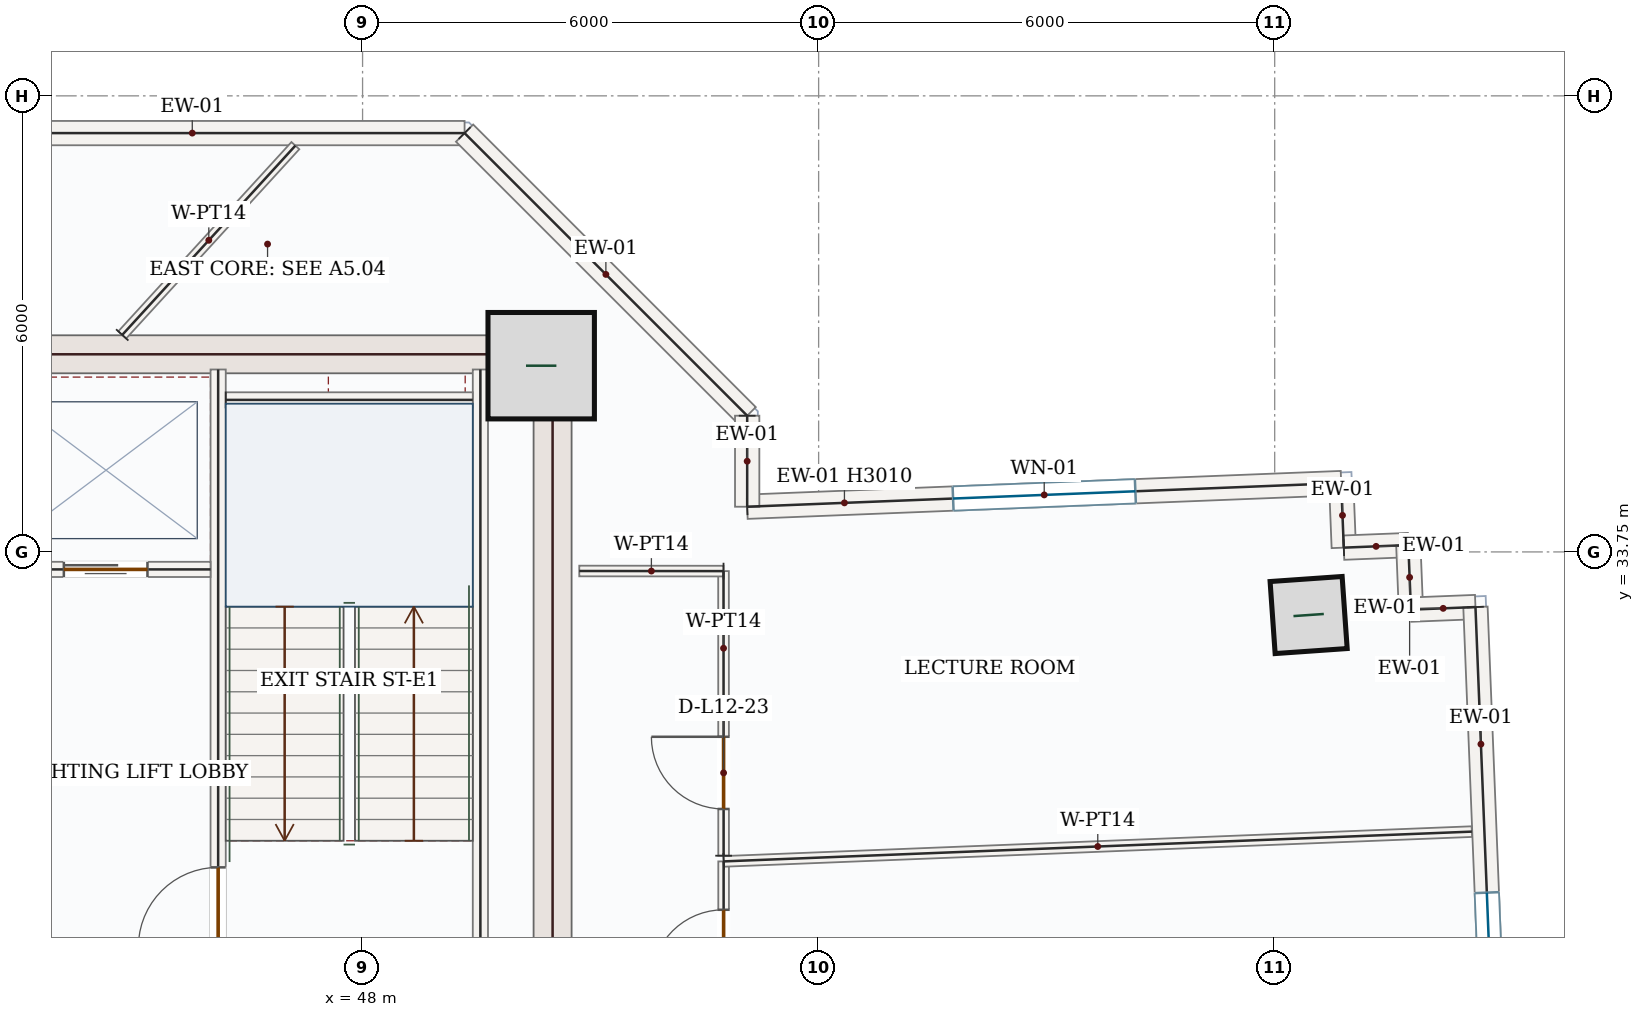
"""IFC4 building model, lengths in metres.
Left out: names, types, materials, properties, quantities, classifications, styles, units other than length and angle.
Written with IfcOpenShell. Run it as: python <this file> out.ifc"""

import sys

from ifc_helpers import new_model, si_unit, direction, frame, frame_2d, origin, origin_2d, place, context, subcontext, project, spatial, rectangle, hollow_rectangle, extrude, source, transform, mapped, element, fill, save


model = new_model("IFC4")
c1 = context("Model", 3, precision=1e-05, world=origin(), true_north=direction((0.0, 1.0)))
c2 = subcontext(c1, "Body", "Model", "MODEL_VIEW")
j1 = project(units=[si_unit("LENGTHUNIT", "METRE"), si_unit("PLANEANGLEUNIT", "RADIAN")], contexts=[c1])
p1 = place(None, origin())
s1 = spatial("IfcSite", under=j1, at=p1, CompositionType="ELEMENT")
p2 = place(p1, origin())
s2 = spatial("IfcBuilding", under=s1, at=p2, CompositionType="ELEMENT")
p3 = place(p2, frame((0.0, 0.0, 58.5)))
s3 = spatial("IfcBuildingStorey", under=s2, at=p3, CompositionType="ELEMENT", Elevation=58.5)
m1 = source(origin(), c2, "Body", "SweptSolid", [
    extrude(rectangle(XDim=8.55, YDim=0.5, at=frame_2d((4.275, 0.0))), origin(), (0.0, 0.0, 1.0), 3.95),
])
p4 = place(p3, frame((50.5, 28.05, 0.0), z_axis=(0.0, 0.0, 1.0), x_axis=(0.0, 1.0, 0.0)))
e1 = element("IfcWall", 1, at=p4, inside=s3, PredefinedType="SHEAR", context=c2, shape_type="MappedRepresentation", body=[
    mapped(m1, transform((0.0, 0.0, 0.0), x_axis=(1.0, 0.0, 0.0), y_axis=(0.0, 1.0, 0.0), z_axis=(0.0, 0.0, 1.0), scale=1.0)),
])
m2 = source(origin(), c2, "Body", "SweptSolid", [
    extrude(rectangle(XDim=7.0, YDim=0.5, at=frame_2d((3.5, 0.0))), origin(), (0.0, 0.0, 1.0), 3.95),
])
p5 = place(p3, frame((43.25, 36.35, 0.0), z_axis=(0.0, 0.0, 1.0), x_axis=(1.0, 0.0, 0.0)))
e2 = element("IfcWall", 2, at=p5, inside=s3, PredefinedType="SHEAR", context=c2, shape_type="MappedRepresentation", body=[
    mapped(m2, transform((0.0, 0.0, 0.0), x_axis=(1.0, 0.0, 0.0), y_axis=(0.0, 1.0, 0.0), z_axis=(0.0, 0.0, 1.0), scale=1.0)),
])
m3 = source(origin(), c2, "Body", "SweptSolid", [
    extrude(rectangle(XDim=1.4, YDim=1.4, at=origin_2d()), origin(), (0.0, 0.0, 1.0), 4.2),
])
p6 = place(p3, frame((50.35, 36.2, 0.0), z_axis=(0.0, 0.0, 1.0), x_axis=(1.0, 0.0, 0.0)))
e3 = element("IfcColumn", 3, at=p6, inside=s3, PredefinedType="COLUMN", context=c2, shape_type="MappedRepresentation", body=[
    mapped(m3, transform((0.0, 0.0, 0.0), x_axis=(1.0, 0.0, 0.0), y_axis=(0.0, 1.0, 0.0), z_axis=(0.0, 0.0, 1.0), scale=1.0)),
])
m4 = source(origin(), c2, "Body", "SweptSolid", [
    extrude(hollow_rectangle(XDim=0.95, YDim=0.95, WallThickness=0.05, at=origin_2d()), origin(), (0.0, 0.0, 1.0), 4.2),
])
p7 = place(p3, frame((60.447, 32.92, 0.0), z_axis=(0.0, 0.0, 1.0), x_axis=(0.99756405026, 0.069756473744, 0.0)))
e4 = element("IfcColumn", 4, at=p7, inside=s3, PredefinedType="COLUMN", context=c2, shape_type="MappedRepresentation", body=[
    mapped(m4, transform((0.0, 0.0, 0.0), x_axis=(1.0, 0.0, 0.0), y_axis=(0.0, 1.0, 0.0), z_axis=(0.0, 0.0, 1.0), scale=1.0)),
])
p8 = place(p3, frame((53.06, 34.344, 0.0), z_axis=(0.0, 0.0, 1.0), x_axis=(0.999208917222, 0.039768577336, 0.0)))
e5 = element("IfcWall", 5, at=p8, inside=s3, PredefinedType="SOLIDWALL", context=c2, shape_type="SweptSolid", body=[
    extrude(rectangle(XDim=7.821, YDim=0.32, at=frame_2d((3.911, 0.0))), origin(), (0.0, 0.0, 1.0), 3.01),
])
p9 = place(p8, frame((2.711, 0.0, 0.85)))
e6 = element("IfcOpeningElement", 6, at=p9, cuts=e5, PredefinedType="OPENING", context=c2, shape_type="SweptSolid", body=[
    extrude(rectangle(XDim=2.4, YDim=1.8, at=frame_2d((1.2, 0.9))), frame((0.0, 0.17, 0.0), z_axis=(0.0, -1.0, 0.0), x_axis=(1.0, 0.0, 0.0)), (0.0, 0.0, 1.0), 0.34),
])
m5 = source(origin(), c2, "Body", "SweptSolid", [
    extrude(rectangle(XDim=0.85, YDim=0.32, at=frame_2d((0.425, 0.0))), origin(), (0.0, 0.0, 1.0), 3.95),
])
p10 = place(p3, frame((60.875, 34.656, 0.0), z_axis=(0.0, 0.0, 1.0), x_axis=(0.039933618331, -0.999202334929, 0.0)))
e7 = element("IfcWall", 7, at=p10, inside=s3, PredefinedType="SOLIDWALL", context=c2, shape_type="MappedRepresentation", body=[
    mapped(m5, transform((0.0, 0.0, 0.0), x_axis=(1.0, 0.0, 0.0), y_axis=(0.0, 1.0, 0.0), z_axis=(0.0, 0.0, 1.0), scale=1.0)),
])
m6 = source(origin(), c2, "Body", "SweptSolid", [
    extrude(rectangle(XDim=0.85, YDim=0.32, at=frame_2d((0.425, 0.0))), origin(), (0.0, 0.0, 1.0), 3.95),
])
for number, where, z_axis, x_axis in (
    (8, (60.909, 33.806, 0.0), (0.0, 0.0, 1.0), (0.999, 0.04, 0.0)),
    (9, (61.758, 33.84, 0.0), (0.0, 0.0, 1.0), (0.04, -0.999, 0.0)),
    (10, (61.792, 32.991, 0.0), (0.0, 0.0, 1.0), (0.999, 0.04, 0.0)),
):
    element("IfcWall", number, at=place(p3, frame(where, z_axis=z_axis, x_axis=x_axis)), inside=s3, PredefinedType="SOLIDWALL", context=c2, shape_type="MappedRepresentation", body=[
        mapped(m6, transform((0.0, 0.0, 0.0), x_axis=(1.0, 0.0, 0.0), y_axis=(0.0, 1.0, 0.0), z_axis=(0.0, 0.0, 1.0), scale=1.0)),
    ])
p11 = place(p3, frame((62.641, 33.025, 0.0), z_axis=(0.0, 0.0, 1.0), x_axis=(0.03977146366, -0.999208802342, 0.0)))
e11 = element("IfcWall", 11, at=p11, inside=s3, PredefinedType="SOLIDWALL", context=c2, shape_type="SweptSolid", body=[
    extrude(rectangle(XDim=9.92, YDim=0.32, at=frame_2d((4.96, 0.0))), origin(), (0.0, 0.0, 1.0), 3.95),
])
p12 = place(p11, frame((3.76, 0.0, 0.85)))
e12 = element("IfcOpeningElement", 12, at=p12, cuts=e11, PredefinedType="OPENING", context=c2, shape_type="SweptSolid", body=[
    extrude(rectangle(XDim=2.4, YDim=1.8, at=frame_2d((1.2, 0.9))), frame((0.0, 0.17, 0.0), z_axis=(0.0, -1.0, 0.0), x_axis=(1.0, 0.0, 0.0)), (0.0, 0.0, 1.0), 0.34),
])
m7 = source(origin(), c2, "Body", "SweptSolid", [
    extrude(rectangle(XDim=7.165, YDim=0.32, at=frame_2d((3.583, 0.0))), origin(), (0.0, 0.0, 1.0), 3.95),
])
p13 = place(p3, frame((42.177, 39.26, 0.0), z_axis=(0.0, 0.0, 1.0), x_axis=(1.0, 0.0, 0.0)))
e13 = element("IfcWall", 13, at=p13, inside=s3, PredefinedType="SOLIDWALL", context=c2, shape_type="MappedRepresentation", body=[
    mapped(m7, transform((0.0, 0.0, 0.0), x_axis=(1.0, 0.0, 0.0), y_axis=(0.0, 1.0, 0.0), z_axis=(0.0, 0.0, 1.0), scale=1.0)),
])
m8 = source(origin(), c2, "Body", "SweptSolid", [
    extrude(rectangle(XDim=5.258, YDim=0.32, at=frame_2d((2.629, 0.0))), origin(), (0.0, 0.0, 1.0), 3.95),
])
p14 = place(p3, frame((49.342, 39.26, 0.0), z_axis=(0.0, 0.0, 1.0), x_axis=(0.707106781187, -0.707106781187, 0.0)))
e14 = element("IfcWall", 14, at=p14, inside=s3, PredefinedType="SOLIDWALL", context=c2, shape_type="MappedRepresentation", body=[
    mapped(m8, transform((0.0, 0.0, 0.0), x_axis=(1.0, 0.0, 0.0), y_axis=(0.0, 1.0, 0.0), z_axis=(0.0, 0.0, 1.0), scale=1.0)),
])
m9 = source(origin(), c2, "Body", "SweptSolid", [
    extrude(rectangle(XDim=1.198, YDim=0.32, at=frame_2d((0.599, 0.0))), origin(), (0.0, 0.0, 1.0), 3.95),
])
p15 = place(p3, frame((53.06, 35.542, 0.0), z_axis=(0.0, 0.0, 1.0), x_axis=(0.0, -1.0, 0.0)))
e15 = element("IfcWall", 15, at=p15, inside=s3, PredefinedType="SOLIDWALL", context=c2, shape_type="MappedRepresentation", body=[
    mapped(m9, transform((0.0, 0.0, 0.0), x_axis=(1.0, 0.0, 0.0), y_axis=(0.0, 1.0, 0.0), z_axis=(0.0, 0.0, 1.0), scale=1.0)),
])
m10 = source(origin(), c2, "Body", "SweptSolid", [
    extrude(rectangle(XDim=7.87, YDim=0.2, at=frame_2d((3.935, 0.0))), origin(), (0.0, 0.0, 1.0), 3.95),
])
p16 = place(p3, frame((49.55, 28.28, 0.0), z_axis=(0.0, 0.0, 1.0), x_axis=(0.0, 1.0, 0.0)))
e16 = element("IfcWall", 16, at=p16, inside=s3, PredefinedType="SOLIDWALL", context=c2, shape_type="MappedRepresentation", body=[
    mapped(m10, transform((0.0, 0.0, 0.0), x_axis=(1.0, 0.0, 0.0), y_axis=(0.0, 1.0, 0.0), z_axis=(0.0, 0.0, 1.0), scale=1.0)),
])
p17 = place(p3, frame((46.1, 28.15, 0.0), z_axis=(0.0, 0.0, 1.0), x_axis=(0.0, 1.0, 0.0)))
e17 = element("IfcWall", 17, at=p17, inside=s3, PredefinedType="SOLIDWALL", context=c2, shape_type="SweptSolid", body=[
    extrude(rectangle(XDim=8.0, YDim=0.2, at=frame_2d((4.0, 0.0))), origin(), (0.0, 0.0, 1.0), 3.95),
])
p18 = place(p17, frame((0.4, 0.0, 0.0)))
e18 = element("IfcOpeningElement", 18, at=p18, cuts=e17, PredefinedType="OPENING", context=c2, shape_type="SweptSolid", body=[
    extrude(rectangle(XDim=1.05, YDim=2.15, at=frame_2d((0.525, 1.075))), frame((0.0, 0.11, 0.0), z_axis=(0.0, -1.0, 0.0), x_axis=(1.0, 0.0, 0.0)), (0.0, 0.0, 1.0), 0.22),
])
m11 = source(origin(), c2, "Body", "SweptSolid", [
    extrude(rectangle(XDim=3.25, YDim=0.2, at=frame_2d((1.625, 0.0))), origin(), (0.0, 0.0, 1.0), 3.95),
])
p19 = place(p3, frame((46.2, 35.75, 0.0), z_axis=(0.0, 0.0, 1.0), x_axis=(1.0, 0.0, 0.0)))
e19 = element("IfcWall", 19, at=p19, inside=s3, PredefinedType="SOLIDWALL", context=c2, shape_type="MappedRepresentation", body=[
    mapped(m11, transform((0.0, 0.0, 0.0), x_axis=(1.0, 0.0, 0.0), y_axis=(0.0, 1.0, 0.0), z_axis=(0.0, 0.0, 1.0), scale=1.0)),
])
p20 = place(p3, frame((43.25, 33.52, 0.0), z_axis=(0.0, 0.0, 1.0), x_axis=(1.0, 0.0, 0.0)))
e20 = element("IfcWall", 20, at=p20, inside=s3, PredefinedType="SOLIDWALL", context=c2, shape_type="SweptSolid", body=[
    extrude(rectangle(XDim=2.75, YDim=0.2, at=frame_2d((1.375, 0.0))), origin(), (0.0, 0.0, 1.0), 3.95),
])
p21 = place(p20, frame((0.82, 0.0, 0.0)))
e21 = element("IfcOpeningElement", 21, at=p21, cuts=e20, PredefinedType="OPENING", context=c2, shape_type="SweptSolid", body=[
    extrude(rectangle(XDim=1.1, YDim=2.15, at=frame_2d((0.55, 1.075))), frame((0.0, 0.11, 0.0), z_axis=(0.0, -1.0, 0.0), x_axis=(1.0, 0.0, 0.0)), (0.0, 0.0, 1.0), 0.22),
])
p22 = place(p3, frame((52.75, 25.835, 0.0), z_axis=(0.0, 0.0, 1.0), x_axis=(0.0, 1.0, 0.0)))
e22 = element("IfcWall", 22, at=p22, inside=s3, PredefinedType="PARTITIONING", context=c2, shape_type="SweptSolid", body=[
    extrude(rectangle(XDim=3.843, YDim=0.14, at=frame_2d((1.921, 0.0))), origin(), (0.0, 0.0, 1.0), 3.95),
])
p23 = place(p22, frame((2.257, 0.0, 0.0)))
e23 = element("IfcOpeningElement", 23, at=p23, cuts=e22, PredefinedType="OPENING", context=c2, shape_type="SweptSolid", body=[
    extrude(rectangle(XDim=0.95, YDim=2.15, at=frame_2d((0.475, 1.075))), frame((0.0, 0.08, 0.0), z_axis=(0.0, -1.0, 0.0), x_axis=(1.0, 0.0, 0.0)), (0.0, 0.0, 1.0), 0.16),
])
m12 = source(origin(), c2, "Body", "SweptSolid", [
    extrude(rectangle(XDim=9.851, YDim=0.14, at=frame_2d((4.925, 0.0))), origin(), (0.0, 0.0, 1.0), 3.95),
])
p24 = place(p3, frame((52.751, 29.678, 0.0), z_axis=(0.0, 0.0, 1.0), x_axis=(0.999208542072, 0.039778002084, 0.0)))
e24 = element("IfcWall", 24, at=p24, inside=s3, PredefinedType="PARTITIONING", context=c2, shape_type="MappedRepresentation", body=[
    mapped(m12, transform((0.0, 0.0, 0.0), x_axis=(1.0, 0.0, 0.0), y_axis=(0.0, 1.0, 0.0), z_axis=(0.0, 0.0, 1.0), scale=1.0)),
])
m13 = source(origin(), c2, "Body", "SweptSolid", [
    extrude(rectangle(XDim=3.375, YDim=0.14, at=frame_2d((1.688, 0.0))), origin(), (0.0, 0.0, 1.0), 3.95),
])
p25 = place(p3, frame((44.838, 36.605, 0.0), z_axis=(0.0, 0.0, 1.0), x_axis=(0.674974079893, 0.737841440604, 0.0)))
e25 = element("IfcWall", 25, at=p25, inside=s3, PredefinedType="PARTITIONING", context=c2, shape_type="MappedRepresentation", body=[
    mapped(m13, transform((0.0, 0.0, 0.0), x_axis=(1.0, 0.0, 0.0), y_axis=(0.0, 1.0, 0.0), z_axis=(0.0, 0.0, 1.0), scale=1.0)),
])
p26 = place(p3, frame((52.75, 29.753, 0.0), z_axis=(0.0, 0.0, 1.0), x_axis=(-0.000326030238, 0.999999946852, 0.0)))
e26 = element("IfcWall", 26, at=p26, inside=s3, PredefinedType="PARTITIONING", context=c2, shape_type="SweptSolid", body=[
    extrude(rectangle(XDim=3.744, YDim=0.14, at=frame_2d((1.872, 0.0))), origin(), (0.0, 0.0, 1.0), 3.95),
])
p27 = place(p26, frame((0.615, 0.0, 0.0)))
e27 = element("IfcOpeningElement", 27, at=p27, cuts=e26, PredefinedType="OPENING", context=c2, shape_type="SweptSolid", body=[
    extrude(rectangle(XDim=0.95, YDim=2.15, at=frame_2d((0.475, 1.075))), frame((0.0, 0.08, 0.0), z_axis=(0.0, -1.0, 0.0), x_axis=(1.0, 0.0, 0.0)), (0.0, 0.0, 1.0), 0.16),
])
m14 = source(origin(), c2, "Body", "SweptSolid", [
    extrude(rectangle(XDim=1.898, YDim=0.14, at=frame_2d((0.949, 0.0))), origin(), (0.0, 0.0, 1.0), 3.95),
])
p28 = place(p3, frame((52.749, 33.498, 0.0), z_axis=(0.0, 0.0, 1.0), x_axis=(-0.999999702083, 0.00077190251, 0.0)))
e28 = element("IfcWall", 28, at=p28, inside=s3, PredefinedType="PARTITIONING", context=c2, shape_type="MappedRepresentation", body=[
    mapped(m14, transform((0.0, 0.0, 0.0), x_axis=(1.0, 0.0, 0.0), y_axis=(0.0, 1.0, 0.0), z_axis=(0.0, 0.0, 1.0), scale=1.0)),
])
m15 = source(origin(), c2, "Body", "SweptSolid", [
    extrude(rectangle(XDim=2.4, YDim=1.8, at=frame_2d((1.2, 0.9))), frame((0.0, 0.03, 0.0), z_axis=(0.0, -1.0, 0.0), x_axis=(1.0, 0.0, 0.0)), (0.0, 0.0, 1.0), 0.06),
])
p29 = place(p9, origin())
e29 = element("IfcWindow", 29, at=p29, inside=s3, PartitioningType="DOUBLE_PANEL_VERTICAL", PredefinedType="WINDOW", context=c2, shape_type="MappedRepresentation", body=[
    mapped(m15, transform((0.0, 0.0, 0.0), x_axis=(1.0, 0.0, 0.0), y_axis=(0.0, 1.0, 0.0), z_axis=(0.0, 0.0, 1.0), scale=1.0)),
])
fill(e6, e29)
p30 = place(p12, origin())
e30 = element("IfcWindow", 30, at=p30, inside=s3, PartitioningType="DOUBLE_PANEL_VERTICAL", PredefinedType="WINDOW", context=c2, shape_type="MappedRepresentation", body=[
    mapped(m15, transform((0.0, 0.0, 0.0), x_axis=(1.0, 0.0, 0.0), y_axis=(0.0, 1.0, 0.0), z_axis=(0.0, 0.0, 1.0), scale=1.0)),
])
fill(e12, e30)
m16 = source(origin(), c2, "Body", "SweptSolid", [
    extrude(rectangle(XDim=1.05, YDim=2.15, at=frame_2d((0.525, 1.075))), frame((0.0, 0.025, 0.0), z_axis=(0.0, -1.0, 0.0), x_axis=(1.0, 0.0, 0.0)), (0.0, 0.0, 1.0), 0.05),
])
p31 = place(p18, origin())
e31 = element("IfcDoor", 31, at=p31, inside=s3, OperationType="SINGLE_SWING_LEFT", PredefinedType="DOOR", context=c2, shape_type="MappedRepresentation", body=[
    mapped(m16, transform((0.0, 0.0, 0.0), x_axis=(1.0, 0.0, 0.0), y_axis=(0.0, 1.0, 0.0), z_axis=(0.0, 0.0, 1.0), scale=1.0)),
])
fill(e18, e31)
m17 = source(origin(), c2, "Body", "SweptSolid", [
    extrude(rectangle(XDim=1.1, YDim=2.15, at=frame_2d((0.55, 1.075))), frame((0.0, 0.025, 0.0), z_axis=(0.0, -1.0, 0.0), x_axis=(1.0, 0.0, 0.0)), (0.0, 0.0, 1.0), 0.05),
])
p32 = place(p21, origin())
e32 = element("IfcDoor", 32, at=p32, inside=s3, OperationType="DOUBLE_DOOR_SLIDING", PredefinedType="DOOR", context=c2, shape_type="MappedRepresentation", body=[
    mapped(m17, transform((0.0, 0.0, 0.0), x_axis=(1.0, 0.0, 0.0), y_axis=(0.0, 1.0, 0.0), z_axis=(0.0, 0.0, 1.0), scale=1.0)),
])
fill(e21, e32)
m18 = source(origin(), c2, "Body", "SweptSolid", [
    extrude(rectangle(XDim=0.95, YDim=2.15, at=frame_2d((0.475, 1.075))), frame((0.0, 0.025, 0.0), z_axis=(0.0, -1.0, 0.0), x_axis=(1.0, 0.0, 0.0)), (0.0, 0.0, 1.0), 0.05),
])
p33 = place(p23, origin())
e33 = element("IfcDoor", 33, at=p33, inside=s3, OperationType="SINGLE_SWING_LEFT", PredefinedType="DOOR", context=c2, shape_type="MappedRepresentation", body=[
    mapped(m18, transform((0.0, 0.0, 0.0), x_axis=(1.0, 0.0, 0.0), y_axis=(0.0, 1.0, 0.0), z_axis=(0.0, 0.0, 1.0), scale=1.0)),
])
fill(e23, e33)
p34 = place(p27, origin())
e34 = element("IfcDoor", 34, at=p34, inside=s3, OperationType="SINGLE_SWING_RIGHT", PredefinedType="DOOR", context=c2, shape_type="MappedRepresentation", body=[
    mapped(m18, transform((0.0, 0.0, 0.0), x_axis=(1.0, 0.0, 0.0), y_axis=(0.0, 1.0, 0.0), z_axis=(0.0, 0.0, 1.0), scale=1.0)),
])
fill(e27, e34)
save(model, sys.argv[1])
